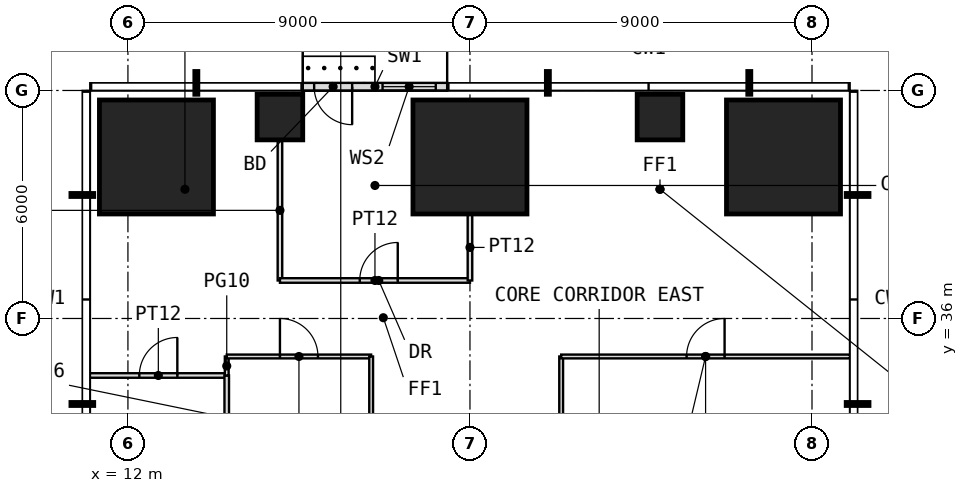
"""IFC4 building model, lengths in metres.
Left out: names, types, materials, properties, quantities, classifications, styles, units other than length and angle.
Written with IfcOpenShell. Run it as: python <this file> out.ifc"""

import sys

from ifc_helpers import new_model, si_unit, direction, frame, frame_2d, origin, origin_2d, place, context, subcontext, project, spatial, rectangle, extrude, element, fill, save


model = new_model("IFC4")
c1 = context("Model", 3, precision=1e-05, world=origin(), true_north=direction((0.0, 1.0)))
c2 = subcontext(c1, "Body", "Model", "MODEL_VIEW")
j1 = project(units=[si_unit("LENGTHUNIT", "METRE"), si_unit("PLANEANGLEUNIT", "RADIAN")], contexts=[c1])
p1 = place(None, origin())
s1 = spatial("IfcSite", under=j1, at=p1, CompositionType="ELEMENT")
p2 = place(p1, origin())
s2 = spatial("IfcBuilding", under=s1, at=p2, CompositionType="ELEMENT")
p3 = place(p2, frame((0.0, 0.0, 116.5)))
s3 = spatial("IfcBuildingStorey", under=s2, at=p3, CompositionType="ELEMENT", Elevation=116.5)
p4 = place(p3, frame((12.75, 40.25, 0.0), z_axis=(0.0, 0.0, 1.0), x_axis=(1.0, 0.0, 0.0)))
e1 = element("IfcColumn", 1, at=p4, inside=s3, PredefinedType="COLUMN", context=c2, shape_type="SweptSolid", body=[
    extrude(rectangle(XDim=3.0, YDim=3.0, at=origin_2d()), origin(), (0.0, 0.0, 1.0), 4.0),
])
p5 = place(p3, frame((16.0, 41.3, 0.0), z_axis=(0.0, 0.0, 1.0), x_axis=(1.0, 0.0, 0.0)))
e2 = element("IfcColumn", 2, at=p5, inside=s3, PredefinedType="COLUMN", context=c2, shape_type="SweptSolid", body=[
    extrude(rectangle(XDim=1.2, YDim=1.2, at=origin_2d()), origin(), (0.0, 0.0, 1.0), 4.0),
])
p6 = place(p3, frame((21.0, 40.25, 0.0), z_axis=(0.0, 0.0, 1.0), x_axis=(1.0, 0.0, 0.0)))
e3 = element("IfcColumn", 3, at=p6, inside=s3, PredefinedType="COLUMN", context=c2, shape_type="SweptSolid", body=[
    extrude(rectangle(XDim=3.0, YDim=3.0, at=origin_2d()), origin(), (0.0, 0.0, 1.0), 4.0),
])
p7 = place(p3, frame((26.0, 41.3, 0.0), z_axis=(0.0, 0.0, 1.0), x_axis=(1.0, 0.0, 0.0)))
e4 = element("IfcColumn", 4, at=p7, inside=s3, PredefinedType="COLUMN", context=c2, shape_type="SweptSolid", body=[
    extrude(rectangle(XDim=1.2, YDim=1.2, at=origin_2d()), origin(), (0.0, 0.0, 1.0), 4.0),
])
p8 = place(p3, frame((29.25, 40.25, 0.0), z_axis=(0.0, 0.0, 1.0), x_axis=(1.0, 0.0, 0.0)))
e5 = element("IfcColumn", 5, at=p8, inside=s3, PredefinedType="COLUMN", context=c2, shape_type="SweptSolid", body=[
    extrude(rectangle(XDim=3.0, YDim=3.0, at=origin_2d()), origin(), (0.0, 0.0, 1.0), 4.0),
])
p9 = place(p3, frame((20.4, 42.1, 0.0), z_axis=(0.0, 0.0, 1.0), x_axis=(-1.0, 0.0, 0.0)))
e6 = element("IfcWall", 6, at=p9, inside=s3, PredefinedType="USERDEFINED", context=c2, shape_type="SweptSolid", body=[
    extrude(rectangle(XDim=3.8, YDim=0.2, at=frame_2d((1.9, 0.0))), origin(), (0.0, 0.0, 1.0), 3.75),
])
p10 = place(p9, frame((2.5, 0.0, 0.0)))
e7 = element("IfcOpeningElement", 7, at=p10, cuts=e6, PredefinedType="OPENING", context=c2, shape_type="SweptSolid", body=[
    extrude(rectangle(XDim=1.0, YDim=2.4, at=frame_2d((0.5, 1.2))), frame((0.0, 0.11, 0.0), z_axis=(0.0, -1.0, 0.0), x_axis=(1.0, 0.0, 0.0)), (0.0, 0.0, 1.0), 0.22),
])
p11 = place(p9, frame((0.3, 0.0, 0.3)))
e8 = element("IfcOpeningElement", 8, at=p11, cuts=e6, PredefinedType="OPENING", context=c2, shape_type="SweptSolid", body=[
    extrude(rectangle(XDim=1.4, YDim=2.7, at=frame_2d((0.7, 1.35))), frame((0.0, 0.11, 0.0), z_axis=(0.0, -1.0, 0.0), x_axis=(1.0, 0.0, 0.0)), (0.0, 0.0, 1.0), 0.22),
])
p12 = place(p3, frame((11.0, 34.5, 0.0), z_axis=(0.0, 0.0, 1.0), x_axis=(1.0, 0.0, 0.0)))
e9 = element("IfcWall", 9, at=p12, inside=s3, PredefinedType="PARTITIONING", context=c2, shape_type="SweptSolid", body=[
    extrude(rectangle(XDim=3.6, YDim=0.12, at=frame_2d((1.8, 0.0))), origin(), (0.0, 0.0, 1.0), 3.75),
])
p13 = place(p12, frame((1.3, 0.0, 0.0)))
e10 = element("IfcOpeningElement", 10, at=p13, cuts=e9, PredefinedType="OPENING", context=c2, shape_type="SweptSolid", body=[
    extrude(rectangle(XDim=1.0, YDim=2.2, at=frame_2d((0.5, 1.1))), frame((0.0, 0.07, 0.0), z_axis=(0.0, -1.0, 0.0), x_axis=(1.0, 0.0, 0.0)), (0.0, 0.0, 1.0), 0.14),
])
p14 = place(p3, frame((14.6, 31.05, 0.0), z_axis=(0.0, 0.0, 1.0), x_axis=(0.0, 1.0, 0.0)))
e11 = element("IfcWall", 11, at=p14, inside=s3, PredefinedType="PARTITIONING", context=c2, shape_type="SweptSolid", body=[
    extrude(rectangle(XDim=3.45, YDim=0.12, at=frame_2d((1.725, 0.0))), origin(), (0.0, 0.0, 1.0), 3.75),
])
p15 = place(p3, frame((14.6, 34.5, 0.0), z_axis=(0.0, 0.0, 1.0), x_axis=(0.0, 1.0, 0.0)))
e12 = element("IfcWall", 12, at=p15, inside=s3, PredefinedType="PARTITIONING", context=c2, shape_type="SweptSolid", body=[
    extrude(rectangle(XDim=0.5, YDim=0.1, at=frame_2d((0.25, 0.0))), origin(), (0.0, 0.0, 1.0), 3.75),
])
p16 = place(p3, frame((14.6, 35.0, 0.0), z_axis=(0.0, 0.0, 1.0), x_axis=(1.0, 0.0, 0.0)))
e13 = element("IfcWall", 13, at=p16, inside=s3, PredefinedType="PARTITIONING", context=c2, shape_type="SweptSolid", body=[
    extrude(rectangle(XDim=3.8, YDim=0.1, at=frame_2d((1.9, 0.0))), origin(), (0.0, 0.0, 1.0), 3.75),
])
p17 = place(p16, frame((1.4, 0.0, 0.0)))
e14 = element("IfcOpeningElement", 14, at=p17, cuts=e13, PredefinedType="OPENING", context=c2, shape_type="SweptSolid", body=[
    extrude(rectangle(XDim=1.0, YDim=2.4, at=frame_2d((0.5, 1.2))), frame((0.0, 0.06, 0.0), z_axis=(0.0, -1.0, 0.0), x_axis=(1.0, 0.0, 0.0)), (0.0, 0.0, 1.0), 0.12),
])
p18 = place(p3, frame((16.0, 37.0, 0.0), z_axis=(0.0, 0.0, 1.0), x_axis=(0.0, 1.0, 0.0)))
e15 = element("IfcWall", 15, at=p18, inside=s3, PredefinedType="PARTITIONING", context=c2, shape_type="SweptSolid", body=[
    extrude(rectangle(XDim=3.69, YDim=0.12, at=frame_2d((1.845, 0.0))), origin(), (0.0, 0.0, 1.0), 3.75),
])
p19 = place(p3, frame((16.0, 37.0, 0.0), z_axis=(0.0, 0.0, 1.0), x_axis=(1.0, 0.0, 0.0)))
e16 = element("IfcWall", 16, at=p19, inside=s3, PredefinedType="PARTITIONING", context=c2, shape_type="SweptSolid", body=[
    extrude(rectangle(XDim=5.0, YDim=0.12, at=frame_2d((2.5, 0.0))), origin(), (0.0, 0.0, 1.0), 3.75),
])
p20 = place(p19, frame((2.1, 0.0, 0.0)))
e17 = element("IfcOpeningElement", 17, at=p20, cuts=e16, PredefinedType="OPENING", context=c2, shape_type="SweptSolid", body=[
    extrude(rectangle(XDim=1.0, YDim=2.2, at=frame_2d((0.5, 1.1))), frame((0.0, 0.07, 0.0), z_axis=(0.0, -1.0, 0.0), x_axis=(1.0, 0.0, 0.0)), (0.0, 0.0, 1.0), 0.14),
])
p21 = place(p3, frame((18.4, 31.05, 0.0), z_axis=(0.0, 0.0, 1.0), x_axis=(0.0, 1.0, 0.0)))
e18 = element("IfcWall", 18, at=p21, inside=s3, PredefinedType="PARTITIONING", context=c2, shape_type="SweptSolid", body=[
    extrude(rectangle(XDim=3.95, YDim=0.1, at=frame_2d((1.975, 0.0))), origin(), (0.0, 0.0, 1.0), 3.75),
])
p22 = place(p3, frame((21.0, 37.0, 0.0), z_axis=(0.0, 0.0, 1.0), x_axis=(0.0, 1.0, 0.0)))
e19 = element("IfcWall", 19, at=p22, inside=s3, PredefinedType="PARTITIONING", context=c2, shape_type="SweptSolid", body=[
    extrude(rectangle(XDim=1.74, YDim=0.12, at=frame_2d((0.87, 0.0))), origin(), (0.0, 0.0, 1.0), 3.75),
])
p23 = place(p3, frame((23.4, 31.05, 0.0), z_axis=(0.0, 0.0, 1.0), x_axis=(0.0, 1.0, 0.0)))
e20 = element("IfcWall", 20, at=p23, inside=s3, PredefinedType="PARTITIONING", context=c2, shape_type="SweptSolid", body=[
    extrude(rectangle(XDim=3.95, YDim=0.1, at=frame_2d((1.975, 0.0))), origin(), (0.0, 0.0, 1.0), 3.75),
])
p24 = place(p3, frame((23.4, 35.0, 0.0), z_axis=(0.0, 0.0, 1.0), x_axis=(1.0, 0.0, 0.0)))
e21 = element("IfcWall", 21, at=p24, inside=s3, PredefinedType="PARTITIONING", context=c2, shape_type="SweptSolid", body=[
    extrude(rectangle(XDim=7.6, YDim=0.1, at=frame_2d((3.8, 0.0))), origin(), (0.0, 0.0, 1.0), 3.75),
])
p25 = place(p24, frame((3.3, 0.0, 0.0)))
e22 = element("IfcOpeningElement", 22, at=p25, cuts=e21, PredefinedType="OPENING", context=c2, shape_type="SweptSolid", body=[
    extrude(rectangle(XDim=1.0, YDim=2.4, at=frame_2d((0.5, 1.2))), frame((0.0, 0.06, 0.0), z_axis=(0.0, -1.0, 0.0), x_axis=(1.0, 0.0, 0.0)), (0.0, 0.0, 1.0), 0.12),
])
p26 = place(p10, origin())
e23 = element("IfcDoor", 23, at=p26, inside=s3, OperationType="SINGLE_SWING_LEFT", PredefinedType="DOOR", context=c2, shape_type="SweptSolid", body=[
    extrude(rectangle(XDim=1.0, YDim=2.4, at=frame_2d((0.5, 1.2))), frame((0.0, 0.025, 0.0), z_axis=(0.0, -1.0, 0.0), x_axis=(1.0, 0.0, 0.0)), (0.0, 0.0, 1.0), 0.05),
])
fill(e7, e23)
p27 = place(p11, origin())
e24 = element("IfcWindow", 24, at=p27, inside=s3, PartitioningType="SINGLE_PANEL", PredefinedType="WINDOW", context=c2, shape_type="SweptSolid", body=[
    extrude(rectangle(XDim=1.4, YDim=2.7, at=frame_2d((0.7, 1.35))), frame((0.0, 0.03, 0.0), z_axis=(0.0, -1.0, 0.0), x_axis=(1.0, 0.0, 0.0)), (0.0, 0.0, 1.0), 0.06),
])
fill(e8, e24)
p28 = place(p13, origin())
e25 = element("IfcDoor", 25, at=p28, inside=s3, OperationType="SINGLE_SWING_RIGHT", PredefinedType="DOOR", context=c2, shape_type="SweptSolid", body=[
    extrude(rectangle(XDim=1.0, YDim=2.2, at=frame_2d((0.5, 1.1))), frame((0.0, 0.025, 0.0), z_axis=(0.0, -1.0, 0.0), x_axis=(1.0, 0.0, 0.0)), (0.0, 0.0, 1.0), 0.05),
])
fill(e10, e25)
p29 = place(p17, origin())
e26 = element("IfcDoor", 26, at=p29, inside=s3, OperationType="SINGLE_SWING_LEFT", PredefinedType="DOOR", context=c2, shape_type="SweptSolid", body=[
    extrude(rectangle(XDim=1.0, YDim=2.4, at=frame_2d((0.5, 1.2))), frame((0.0, 0.025, 0.0), z_axis=(0.0, -1.0, 0.0), x_axis=(1.0, 0.0, 0.0)), (0.0, 0.0, 1.0), 0.05),
])
fill(e14, e26)
p30 = place(p25, origin())
e27 = element("IfcDoor", 27, at=p30, inside=s3, OperationType="SINGLE_SWING_RIGHT", PredefinedType="DOOR", context=c2, shape_type="SweptSolid", body=[
    extrude(rectangle(XDim=1.0, YDim=2.4, at=frame_2d((0.5, 1.2))), frame((0.0, 0.025, 0.0), z_axis=(0.0, -1.0, 0.0), x_axis=(1.0, 0.0, 0.0)), (0.0, 0.0, 1.0), 0.05),
])
fill(e22, e27)
p31 = place(p20, origin())
e28 = element("IfcDoor", 28, at=p31, inside=s3, OperationType="SINGLE_SWING_RIGHT", PredefinedType="DOOR", context=c2, shape_type="SweptSolid", body=[
    extrude(rectangle(XDim=1.0, YDim=2.2, at=frame_2d((0.5, 1.1))), frame((0.0, 0.025, 0.0), z_axis=(0.0, -1.0, 0.0), x_axis=(1.0, 0.0, 0.0)), (0.0, 0.0, 1.0), 0.05),
])
fill(e17, e28)
save(model, sys.argv[1])
